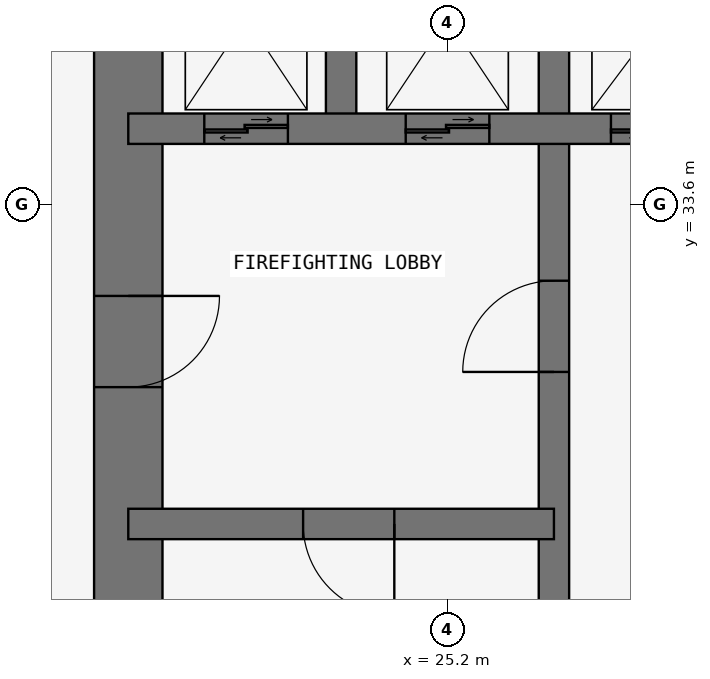
"""IFC4 building model, lengths in metres.
Left out: names, types, materials, properties, quantities, classifications, styles, units other than length and angle.
Written with IfcOpenShell. Run it as: python <this file> out.ifc"""

import sys

from ifc_helpers import new_model, si_unit, direction, frame, frame_2d, origin, place, context, subcontext, project, spatial, rectangle, extrude, element, fill, save


model = new_model("IFC4")
c1 = context("Model", 3, precision=1e-05, world=origin(), true_north=direction((0.0, 1.0)))
c2 = subcontext(c1, "Body", "Model", "MODEL_VIEW")
j1 = project(units=[si_unit("LENGTHUNIT", "METRE"), si_unit("PLANEANGLEUNIT", "RADIAN")], contexts=[c1])
p1 = place(None, origin())
s1 = spatial("IfcSite", under=j1, at=p1, CompositionType="ELEMENT")
p2 = place(p1, origin())
s2 = spatial("IfcBuilding", under=s1, at=p2, CompositionType="ELEMENT")
p3 = place(p2, frame((0.0, 0.0, 148.5)))
s3 = spatial("IfcBuildingStorey", under=s2, at=p3, CompositionType="ELEMENT", Elevation=148.5)
p4 = place(p3, frame((21.0, 37.8, 0.0), z_axis=(0.0, 0.0, 1.0), x_axis=(0.0, -1.0, 0.0)))
e1 = element("IfcWall", 1, at=p4, inside=s3, PredefinedType="SHEAR", context=c2, shape_type="SweptSolid", body=[
    extrude(rectangle(XDim=17.25, YDim=0.9, at=frame_2d((8.625, 0.0))), origin(), (0.0, 0.0, 1.0), 3.6),
])
p5 = place(p4, frame((5.4, 0.0, 0.0)))
e2 = element("IfcOpeningElement", 2, at=p5, cuts=e1, PredefinedType="OPENING", context=c2, shape_type="SweptSolid", body=[
    extrude(rectangle(XDim=1.2, YDim=2.1, at=frame_2d((0.6, 1.05))), frame((0.0, 0.46, 0.0), z_axis=(0.0, -1.0, 0.0), x_axis=(1.0, 0.0, 0.0)), (0.0, 0.0, 1.0), 0.92),
])
p6 = place(p3, frame((26.6, 21.0, 0.0), z_axis=(0.0, 0.0, 1.0), x_axis=(0.0, 1.0, 0.0)))
e3 = element("IfcWall", 3, at=p6, inside=s3, PredefinedType="SHEAR", context=c2, shape_type="SweptSolid", body=[
    extrude(rectangle(XDim=16.8, YDim=0.4, at=frame_2d((8.4, 0.0))), origin(), (0.0, 0.0, 1.0), 3.6),
])
p7 = place(p6, frame((10.4, 0.0, 0.0)))
e4 = element("IfcOpeningElement", 4, at=p7, cuts=e3, PredefinedType="OPENING", context=c2, shape_type="SweptSolid", body=[
    extrude(rectangle(XDim=1.2, YDim=2.1, at=frame_2d((0.6, 1.05))), frame((0.0, 0.21, 0.0), z_axis=(0.0, -1.0, 0.0), x_axis=(1.0, 0.0, 0.0)), (0.0, 0.0, 1.0), 0.42),
])
p8 = place(p3, frame((21.0, 29.4, 0.0), z_axis=(0.0, 0.0, 1.0), x_axis=(1.0, 0.0, 0.0)))
e5 = element("IfcWall", 5, at=p8, inside=s3, PredefinedType="SHEAR", context=c2, shape_type="SweptSolid", body=[
    extrude(rectangle(XDim=5.6, YDim=0.4, at=frame_2d((2.8, 0.0))), origin(), (0.0, 0.0, 1.0), 3.6),
])
p9 = place(p8, frame((2.3, 0.0, 0.0)))
e6 = element("IfcOpeningElement", 6, at=p9, cuts=e5, PredefinedType="OPENING", context=c2, shape_type="SweptSolid", body=[
    extrude(rectangle(XDim=1.2, YDim=2.1, at=frame_2d((0.6, 1.05))), frame((0.0, 0.21, 0.0), z_axis=(0.0, -1.0, 0.0), x_axis=(1.0, 0.0, 0.0)), (0.0, 0.0, 1.0), 0.42),
])
p10 = place(p3, frame((21.0, 34.6, 0.0), z_axis=(0.0, 0.0, 1.0), x_axis=(1.0, 0.0, 0.0)))
e7 = element("IfcWall", 7, at=p10, inside=s3, PredefinedType="SHEAR", context=c2, shape_type="SweptSolid", body=[
    extrude(rectangle(XDim=11.2, YDim=0.4, at=frame_2d((5.6, 0.0))), origin(), (0.0, 0.0, 1.0), 3.6),
])
p11 = place(p10, frame((9.35, 0.0, 0.0)))
e8 = element("IfcOpeningElement", 8, at=p11, cuts=e7, PredefinedType="OPENING", context=c2, shape_type="SweptSolid", body=[
    extrude(rectangle(XDim=0.9, YDim=2.1, at=frame_2d((0.45, 1.05))), frame((0.0, 0.21, 0.0), z_axis=(0.0, -1.0, 0.0), x_axis=(1.0, 0.0, 0.0)), (0.0, 0.0, 1.0), 0.42),
])
p12 = place(p10, frame((1.0, 0.0, 0.0)))
e9 = element("IfcOpeningElement", 9, at=p12, cuts=e7, PredefinedType="OPENING", context=c2, shape_type="SweptSolid", body=[
    extrude(rectangle(XDim=1.1, YDim=2.1, at=frame_2d((0.55, 1.05))), frame((0.0, 0.21, 0.0), z_axis=(0.0, -1.0, 0.0), x_axis=(1.0, 0.0, 0.0)), (0.0, 0.0, 1.0), 0.42),
])
p13 = place(p10, frame((3.65, 0.0, 0.0)))
e10 = element("IfcOpeningElement", 10, at=p13, cuts=e7, PredefinedType="OPENING", context=c2, shape_type="SweptSolid", body=[
    extrude(rectangle(XDim=1.1, YDim=2.1, at=frame_2d((0.55, 1.05))), frame((0.0, 0.21, 0.0), z_axis=(0.0, -1.0, 0.0), x_axis=(1.0, 0.0, 0.0)), (0.0, 0.0, 1.0), 0.42),
])
p14 = place(p10, frame((6.35, 0.0, 0.0)))
e11 = element("IfcOpeningElement", 11, at=p14, cuts=e7, PredefinedType="OPENING", context=c2, shape_type="SweptSolid", body=[
    extrude(rectangle(XDim=1.3, YDim=2.1, at=frame_2d((0.65, 1.05))), frame((0.0, 0.21, 0.0), z_axis=(0.0, -1.0, 0.0), x_axis=(1.0, 0.0, 0.0)), (0.0, 0.0, 1.0), 0.42),
])
p15 = place(p3, frame((23.8, 34.6, 0.0), z_axis=(0.0, 0.0, 1.0), x_axis=(0.0, 1.0, 0.0)))
e12 = element("IfcWall", 12, at=p15, inside=s3, PredefinedType="SHEAR", context=c2, shape_type="SweptSolid", body=[
    extrude(rectangle(XDim=3.2, YDim=0.4, at=frame_2d((1.6, 0.0))), origin(), (0.0, 0.0, 1.0), 3.6),
])
p16 = place(p5, origin())
e13 = element("IfcDoor", 13, at=p16, inside=s3, OperationType="SINGLE_SWING_LEFT", PredefinedType="DOOR", context=c2, shape_type="SweptSolid", body=[
    extrude(rectangle(XDim=1.2, YDim=2.1, at=frame_2d((0.6, 1.05))), frame((0.0, 0.025, 0.0), z_axis=(0.0, -1.0, 0.0), x_axis=(1.0, 0.0, 0.0)), (0.0, 0.0, 1.0), 0.05),
])
fill(e2, e13)
p17 = place(p9, frame((1.2, 0.0, 0.0), z_axis=(0.0, 0.0, 1.0), x_axis=(-1.0, 0.0, 0.0)))
e14 = element("IfcDoor", 14, at=p17, inside=s3, OperationType="SINGLE_SWING_LEFT", PredefinedType="DOOR", context=c2, shape_type="SweptSolid", body=[
    extrude(rectangle(XDim=1.2, YDim=2.1, at=frame_2d((0.6, 1.05))), frame((0.0, 0.025, 0.0), z_axis=(0.0, -1.0, 0.0), x_axis=(1.0, 0.0, 0.0)), (0.0, 0.0, 1.0), 0.05),
])
fill(e6, e14)
p18 = place(p7, origin())
e15 = element("IfcDoor", 15, at=p18, inside=s3, OperationType="SINGLE_SWING_LEFT", PredefinedType="DOOR", context=c2, shape_type="SweptSolid", body=[
    extrude(rectangle(XDim=1.2, YDim=2.1, at=frame_2d((0.6, 1.05))), frame((0.0, 0.025, 0.0), z_axis=(0.0, -1.0, 0.0), x_axis=(1.0, 0.0, 0.0)), (0.0, 0.0, 1.0), 0.05),
])
fill(e4, e15)
p19 = place(p12, origin())
e16 = element("IfcDoor", 16, at=p19, inside=s3, OperationType="DOUBLE_DOOR_SLIDING", PredefinedType="DOOR", context=c2, shape_type="SweptSolid", body=[
    extrude(rectangle(XDim=1.1, YDim=2.1, at=frame_2d((0.55, 1.05))), frame((0.0, 0.025, 0.0), z_axis=(0.0, -1.0, 0.0), x_axis=(1.0, 0.0, 0.0)), (0.0, 0.0, 1.0), 0.05),
])
fill(e9, e16)
p20 = place(p13, origin())
e17 = element("IfcDoor", 17, at=p20, inside=s3, OperationType="DOUBLE_DOOR_SLIDING", PredefinedType="DOOR", context=c2, shape_type="SweptSolid", body=[
    extrude(rectangle(XDim=1.1, YDim=2.1, at=frame_2d((0.55, 1.05))), frame((0.0, 0.025, 0.0), z_axis=(0.0, -1.0, 0.0), x_axis=(1.0, 0.0, 0.0)), (0.0, 0.0, 1.0), 0.05),
])
fill(e10, e17)
p21 = place(p14, origin())
e18 = element("IfcDoor", 18, at=p21, inside=s3, OperationType="DOUBLE_DOOR_SLIDING", PredefinedType="DOOR", context=c2, shape_type="SweptSolid", body=[
    extrude(rectangle(XDim=1.3, YDim=2.1, at=frame_2d((0.65, 1.05))), frame((0.0, 0.025, 0.0), z_axis=(0.0, -1.0, 0.0), x_axis=(1.0, 0.0, 0.0)), (0.0, 0.0, 1.0), 0.05),
])
fill(e11, e18)
save(model, sys.argv[1])
